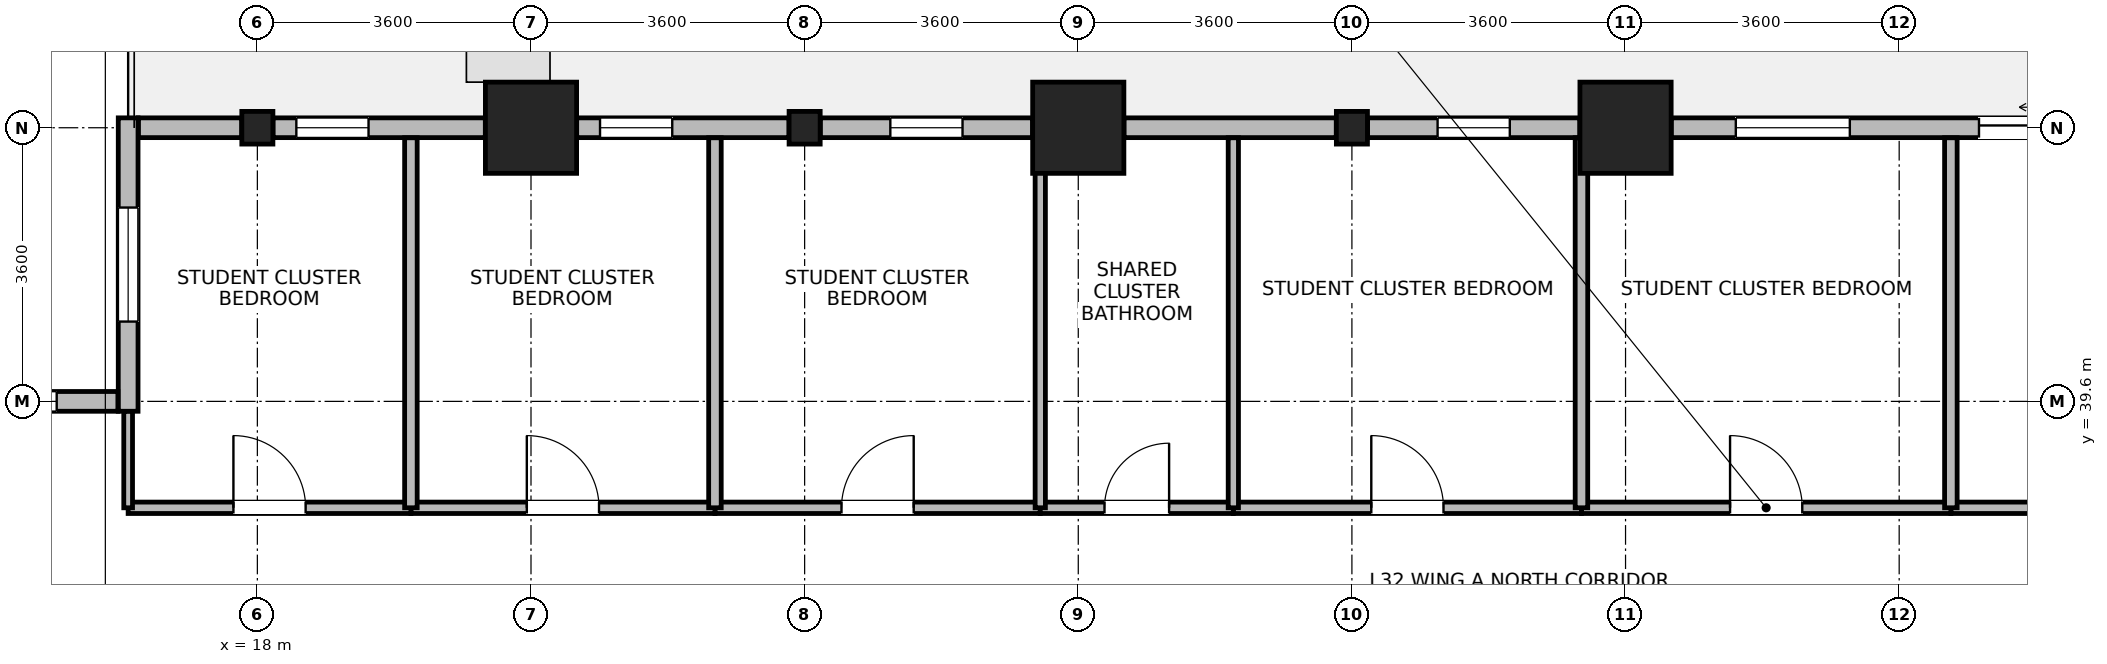
"""IFC4 building model, lengths in metres.
Left out: names, types, materials, properties, quantities, classifications, styles, units other than length and angle.
Written with IfcOpenShell. Run it as: python <this file> out.ifc"""

import sys

from ifc_helpers import new_model, si_unit, direction, frame, frame_2d, origin, origin_2d, place, context, subcontext, project, spatial, rectangle, i_section, extrude, source, transform, mapped, element, fill, save


model = new_model("IFC4")
c1 = context("Model", 3, precision=1e-05, world=origin(), true_north=direction((0.0, 1.0)))
c2 = subcontext(c1, "Body", "Model", "MODEL_VIEW")
j1 = project(units=[si_unit("LENGTHUNIT", "METRE"), si_unit("PLANEANGLEUNIT", "RADIAN")], contexts=[c1])
p1 = place(None, origin())
s1 = spatial("IfcSite", under=j1, at=p1, CompositionType="ELEMENT")
p2 = place(p1, origin())
s2 = spatial("IfcBuilding", under=s1, at=p2, CompositionType="ELEMENT")
p3 = place(p2, frame((0.0, 0.0, 126.7)))
s3 = spatial("IfcBuildingStorey", under=s2, at=p3, CompositionType="ELEMENT", Elevation=126.7)
m1 = source(origin(), c2, "Body", "SweptSolid", [
    extrude(rectangle(XDim=1.2, YDim=1.2, at=origin_2d()), origin(), (0.0, 0.0, 1.0), 3.7),
])
for number, where, z_axis, x_axis in (
    (1, (21.6, 43.2, 0.0), (0.0, 0.0, 1.0), (1.0, 0.0, 0.0)),
    (2, (28.8, 43.2, 0.0), (0.0, 0.0, 1.0), (1.0, 0.0, 0.0)),
    (3, (36.0, 43.2, 0.0), (0.0, 0.0, 1.0), (1.0, 0.0, 0.0)),
):
    element("IfcColumn", number, at=place(p3, frame(where, z_axis=z_axis, x_axis=x_axis)), inside=s3, PredefinedType="COLUMN", context=c2, shape_type="MappedRepresentation", body=[
        mapped(m1, transform((0.0, 0.0, 0.0), x_axis=(1.0, 0.0, 0.0), y_axis=(0.0, 1.0, 0.0), z_axis=(0.0, 0.0, 1.0), scale=1.0)),
    ])
m2 = source(origin(), c2, "Body", "SweptSolid", [
    extrude(i_section(OverallWidth=0.409, OverallDepth=0.43, WebThickness=0.024, FlangeThickness=0.033, FilletRadius=0.015, at=origin_2d()), origin(), (0.0, 0.0, 1.0), 3.7),
])
for number, where, z_axis, x_axis in (
    (4, (18.0, 43.2, 0.0), (0.0, 0.0, 1.0), (1.0, 0.0, 0.0)),
    (5, (25.2, 43.2, 0.0), (0.0, 0.0, 1.0), (1.0, 0.0, 0.0)),
    (6, (32.4, 43.2, 0.0), (0.0, 0.0, 1.0), (1.0, 0.0, 0.0)),
):
    element("IfcColumn", number, at=place(p3, frame(where, z_axis=z_axis, x_axis=x_axis)), inside=s3, PredefinedType="COLUMN", context=c2, shape_type="MappedRepresentation", body=[
        mapped(m2, transform((0.0, 0.0, 0.0), x_axis=(1.0, 0.0, 0.0), y_axis=(0.0, 1.0, 0.0), z_axis=(0.0, 0.0, 1.0), scale=1.0)),
    ])
p4 = place(p3, frame((36.601, 43.2, 0.0), z_axis=(0.0, 0.0, 1.0), x_axis=(1.0, 0.0, 0.0)))
e7 = element("IfcWall", 7, at=p4, inside=s3, PredefinedType="STANDARD", context=c2, shape_type="SweptSolid", body=[
    extrude(rectangle(XDim=9.598, YDim=0.26, at=frame_2d((4.799, 0.0))), origin(), (0.0, 0.0, 1.0), 2.87),
])
p5 = place(p4, frame((4.049, 0.0, 0.0)))
e8 = element("IfcOpeningElement", 8, at=p5, cuts=e7, PredefinedType="OPENING", context=c2, shape_type="SweptSolid", body=[
    extrude(rectangle(XDim=1.5, YDim=2.15, at=frame_2d((0.75, 1.075))), frame((0.0, 0.14, 0.0), z_axis=(0.0, -1.0, 0.0), x_axis=(1.0, 0.0, 0.0)), (0.0, 0.0, 1.0), 0.28),
])
p6 = place(p4, frame((0.85, 0.0, 0.85)))
e9 = element("IfcOpeningElement", 9, at=p6, cuts=e7, PredefinedType="OPENING", context=c2, shape_type="SweptSolid", body=[
    extrude(rectangle(XDim=1.5, YDim=1.85, at=frame_2d((0.75, 0.925))), frame((0.0, 0.14, 0.0), z_axis=(0.0, -1.0, 0.0), x_axis=(1.0, 0.0, 0.0)), (0.0, 0.0, 1.0), 0.28),
])
p7 = place(p4, frame((7.248, 0.0, 0.85)))
e10 = element("IfcOpeningElement", 10, at=p7, cuts=e7, PredefinedType="OPENING", context=c2, shape_type="SweptSolid", body=[
    extrude(rectangle(XDim=1.5, YDim=1.85, at=frame_2d((0.75, 0.925))), frame((0.0, 0.14, 0.0), z_axis=(0.0, -1.0, 0.0), x_axis=(1.0, 0.0, 0.0)), (0.0, 0.0, 1.0), 0.28),
])
p8 = place(p3, frame((32.605, 43.2, 0.0), z_axis=(0.0, 0.0, 1.0), x_axis=(1.0, 0.0, 0.0)))
e11 = element("IfcWall", 11, at=p8, inside=s3, PredefinedType="STANDARD", context=c2, shape_type="SweptSolid", body=[
    extrude(rectangle(XDim=2.793, YDim=0.26, at=frame_2d((1.397, 0.0))), origin(), (0.0, 0.0, 1.0), 2.87),
])
p9 = place(p8, frame((0.922, 0.0, 0.85)))
e12 = element("IfcOpeningElement", 12, at=p9, cuts=e11, PredefinedType="OPENING", context=c2, shape_type="SweptSolid", body=[
    extrude(rectangle(XDim=0.95, YDim=1.75, at=frame_2d((0.475, 0.875))), frame((0.0, 0.14, 0.0), z_axis=(0.0, -1.0, 0.0), x_axis=(1.0, 0.0, 0.0)), (0.0, 0.0, 1.0), 0.28),
])
p10 = place(p3, frame((29.401, 43.2, 0.0), z_axis=(0.0, 0.0, 1.0), x_axis=(1.0, 0.0, 0.0)))
e13 = element("IfcWall", 13, at=p10, inside=s3, PredefinedType="STANDARD", context=c2, shape_type="SweptSolid", body=[
    extrude(rectangle(XDim=2.794, YDim=0.26, at=frame_2d((1.397, 0.0))), origin(), (0.0, 0.0, 1.0), 2.87),
])
p11 = place(p3, frame((25.406, 43.2, 0.0), z_axis=(0.0, 0.0, 1.0), x_axis=(1.0, 0.0, 0.0)))
e14 = element("IfcWall", 14, at=p11, inside=s3, PredefinedType="STANDARD", context=c2, shape_type="SweptSolid", body=[
    extrude(rectangle(XDim=2.793, YDim=0.26, at=frame_2d((1.397, 0.0))), origin(), (0.0, 0.0, 1.0), 2.87),
])
p12 = place(p11, frame((0.922, 0.0, 0.85)))
e15 = element("IfcOpeningElement", 15, at=p12, cuts=e14, PredefinedType="OPENING", context=c2, shape_type="SweptSolid", body=[
    extrude(rectangle(XDim=0.95, YDim=1.75, at=frame_2d((0.475, 0.875))), frame((0.0, 0.14, 0.0), z_axis=(0.0, -1.0, 0.0), x_axis=(1.0, 0.0, 0.0)), (0.0, 0.0, 1.0), 0.28),
])
p13 = place(p3, frame((22.201, 43.2, 0.0), z_axis=(0.0, 0.0, 1.0), x_axis=(1.0, 0.0, 0.0)))
e16 = element("IfcWall", 16, at=p13, inside=s3, PredefinedType="STANDARD", context=c2, shape_type="SweptSolid", body=[
    extrude(rectangle(XDim=2.793, YDim=0.26, at=frame_2d((1.397, 0.0))), origin(), (0.0, 0.0, 1.0), 2.87),
])
p14 = place(p13, frame((0.307, 0.0, 0.85)))
e17 = element("IfcOpeningElement", 17, at=p14, cuts=e16, PredefinedType="OPENING", context=c2, shape_type="SweptSolid", body=[
    extrude(rectangle(XDim=0.95, YDim=1.75, at=frame_2d((0.475, 0.875))), frame((0.0, 0.14, 0.0), z_axis=(0.0, -1.0, 0.0), x_axis=(1.0, 0.0, 0.0)), (0.0, 0.0, 1.0), 0.28),
])
p15 = place(p3, frame((18.206, 43.2, 0.0), z_axis=(0.0, 0.0, 1.0), x_axis=(1.0, 0.0, 0.0)))
e18 = element("IfcWall", 18, at=p15, inside=s3, PredefinedType="STANDARD", context=c2, shape_type="SweptSolid", body=[
    extrude(rectangle(XDim=2.793, YDim=0.26, at=frame_2d((1.397, 0.0))), origin(), (0.0, 0.0, 1.0), 2.87),
])
p16 = place(p15, frame((0.307, 0.0, 0.85)))
e19 = element("IfcOpeningElement", 19, at=p16, cuts=e18, PredefinedType="OPENING", context=c2, shape_type="SweptSolid", body=[
    extrude(rectangle(XDim=0.95, YDim=1.75, at=frame_2d((0.475, 0.875))), frame((0.0, 0.14, 0.0), z_axis=(0.0, -1.0, 0.0), x_axis=(1.0, 0.0, 0.0)), (0.0, 0.0, 1.0), 0.28),
])
p17 = place(p3, frame((16.435, 43.2, 0.0), z_axis=(0.0, 0.0, 1.0), x_axis=(1.0, 0.0, 0.0)))
e20 = element("IfcWall", 20, at=p17, inside=s3, PredefinedType="STANDARD", context=c2, shape_type="SweptSolid", body=[
    extrude(rectangle(XDim=1.359, YDim=0.26, at=frame_2d((0.68, 0.0))), origin(), (0.0, 0.0, 1.0), 2.87),
])
p18 = place(p3, frame((16.3, 39.47, 0.0), z_axis=(0.0, 0.0, 1.0), x_axis=(0.0, 1.0, 0.0)))
e21 = element("IfcWall", 21, at=p18, inside=s3, PredefinedType="STANDARD", context=c2, shape_type="SweptSolid", body=[
    extrude(rectangle(XDim=3.86, YDim=0.26, at=frame_2d((1.93, 0.0))), origin(), (0.0, 0.0, 1.0), 3.32),
])
p19 = place(p18, frame((1.18, 0.0, 0.85)))
e22 = element("IfcOpeningElement", 22, at=p19, cuts=e21, PredefinedType="OPENING", context=c2, shape_type="SweptSolid", body=[
    extrude(rectangle(XDim=1.5, YDim=1.85, at=frame_2d((0.75, 0.925))), frame((0.0, 0.14, 0.0), z_axis=(0.0, -1.0, 0.0), x_axis=(1.0, 0.0, 0.0)), (0.0, 0.0, 1.0), 0.28),
])
p20 = place(p3, frame((6.835, 39.6, 0.0), z_axis=(0.0, 0.0, 1.0), x_axis=(1.0, 0.0, 0.0)))
e23 = element("IfcWall", 23, at=p20, inside=s3, PredefinedType="STANDARD", context=c2, shape_type="SweptSolid", body=[
    extrude(rectangle(XDim=9.33, YDim=0.26, at=frame_2d((4.665, 0.0))), origin(), (0.0, 0.0, 1.0), 3.32),
])
p21 = place(p20, frame((0.805, 0.0, 0.85)))
e24 = element("IfcOpeningElement", 24, at=p21, cuts=e23, PredefinedType="OPENING", context=c2, shape_type="SweptSolid", body=[
    extrude(rectangle(XDim=1.5, YDim=1.85, at=frame_2d((0.75, 0.925))), frame((0.0, 0.14, 0.0), z_axis=(0.0, -1.0, 0.0), x_axis=(1.0, 0.0, 0.0)), (0.0, 0.0, 1.0), 0.28),
])
p22 = place(p20, frame((3.915, 0.0, 0.85)))
e25 = element("IfcOpeningElement", 25, at=p22, cuts=e23, PredefinedType="OPENING", context=c2, shape_type="SweptSolid", body=[
    extrude(rectangle(XDim=1.5, YDim=1.85, at=frame_2d((0.75, 0.925))), frame((0.0, 0.14, 0.0), z_axis=(0.0, -1.0, 0.0), x_axis=(1.0, 0.0, 0.0)), (0.0, 0.0, 1.0), 0.28),
])
p23 = place(p20, frame((7.025, 0.0, 0.85)))
e26 = element("IfcOpeningElement", 26, at=p23, cuts=e23, PredefinedType="OPENING", context=c2, shape_type="SweptSolid", body=[
    extrude(rectangle(XDim=1.5, YDim=1.85, at=frame_2d((0.75, 0.925))), frame((0.0, 0.14, 0.0), z_axis=(0.0, -1.0, 0.0), x_axis=(1.0, 0.0, 0.0)), (0.0, 0.0, 1.0), 0.28),
])
p24 = place(p3, frame((40.28, 38.2, 0.0), z_axis=(0.0, 0.0, 1.0), x_axis=(1.0, 0.0, 0.0)))
e27 = element("IfcWall", 27, at=p24, inside=s3, PredefinedType="PARTITIONING", context=c2, shape_type="SweptSolid", body=[
    extrude(rectangle(XDim=8.96, YDim=0.15, at=frame_2d((4.48, 0.0))), origin(), (0.0, 0.0, 1.0), 3.32),
])
p25 = place(p24, frame((4.03, 0.0, 0.0)))
e28 = element("IfcOpeningElement", 28, at=p25, cuts=e27, PredefinedType="OPENING", context=c2, shape_type="SweptSolid", body=[
    extrude(rectangle(XDim=0.9, YDim=2.08, at=frame_2d((0.45, 1.04))), frame((0.0, 0.085, 0.0), z_axis=(0.0, -1.0, 0.0), x_axis=(1.0, 0.0, 0.0)), (0.0, 0.0, 1.0), 0.17),
])
p26 = place(p3, frame((35.42, 38.2, 0.0), z_axis=(0.0, 0.0, 1.0), x_axis=(1.0, 0.0, 0.0)))
e29 = element("IfcWall", 29, at=p26, inside=s3, PredefinedType="PARTITIONING", context=c2, shape_type="SweptSolid", body=[
    extrude(rectangle(XDim=4.86, YDim=0.15, at=frame_2d((2.43, 0.0))), origin(), (0.0, 0.0, 1.0), 3.32),
])
p27 = place(p26, frame((1.955, 0.0, 0.0)))
e30 = element("IfcOpeningElement", 30, at=p27, cuts=e29, PredefinedType="OPENING", context=c2, shape_type="SweptSolid", body=[
    extrude(rectangle(XDim=0.95, YDim=2.1, at=frame_2d((0.475, 1.05))), frame((0.0, 0.085, 0.0), z_axis=(0.0, -1.0, 0.0), x_axis=(1.0, 0.0, 0.0)), (0.0, 0.0, 1.0), 0.17),
])
p28 = place(p3, frame((30.84, 38.2, 0.0), z_axis=(0.0, 0.0, 1.0), x_axis=(1.0, 0.0, 0.0)))
e31 = element("IfcWall", 31, at=p28, inside=s3, PredefinedType="PARTITIONING", context=c2, shape_type="SweptSolid", body=[
    extrude(rectangle(XDim=4.58, YDim=0.15, at=frame_2d((2.29, 0.0))), origin(), (0.0, 0.0, 1.0), 3.32),
])
p29 = place(p28, frame((1.815, 0.0, 0.0)))
e32 = element("IfcOpeningElement", 32, at=p29, cuts=e31, PredefinedType="OPENING", context=c2, shape_type="SweptSolid", body=[
    extrude(rectangle(XDim=0.95, YDim=2.1, at=frame_2d((0.475, 1.05))), frame((0.0, 0.085, 0.0), z_axis=(0.0, -1.0, 0.0), x_axis=(1.0, 0.0, 0.0)), (0.0, 0.0, 1.0), 0.17),
])
p30 = place(p3, frame((24.02, 38.2, 0.0), z_axis=(0.0, 0.0, 1.0), x_axis=(1.0, 0.0, 0.0)))
e33 = element("IfcWall", 33, at=p30, inside=s3, PredefinedType="PARTITIONING", context=c2, shape_type="SweptSolid", body=[
    extrude(rectangle(XDim=4.28, YDim=0.15, at=frame_2d((2.14, 0.0))), origin(), (0.0, 0.0, 1.0), 3.32),
])
p31 = place(p30, frame((1.665, 0.0, 0.0)))
e34 = element("IfcOpeningElement", 34, at=p31, cuts=e33, PredefinedType="OPENING", context=c2, shape_type="SweptSolid", body=[
    extrude(rectangle(XDim=0.95, YDim=2.1, at=frame_2d((0.475, 1.05))), frame((0.0, 0.085, 0.0), z_axis=(0.0, -1.0, 0.0), x_axis=(1.0, 0.0, 0.0)), (0.0, 0.0, 1.0), 0.17),
])
p32 = place(p3, frame((20.02, 38.2, 0.0), z_axis=(0.0, 0.0, 1.0), x_axis=(1.0, 0.0, 0.0)))
e35 = element("IfcWall", 35, at=p32, inside=s3, PredefinedType="PARTITIONING", context=c2, shape_type="SweptSolid", body=[
    extrude(rectangle(XDim=4.0, YDim=0.15, at=frame_2d((2.0, 0.0))), origin(), (0.0, 0.0, 1.0), 3.32),
])
p33 = place(p32, frame((1.525, 0.0, 0.0)))
e36 = element("IfcOpeningElement", 36, at=p33, cuts=e35, PredefinedType="OPENING", context=c2, shape_type="SweptSolid", body=[
    extrude(rectangle(XDim=0.95, YDim=2.1, at=frame_2d((0.475, 1.05))), frame((0.0, 0.085, 0.0), z_axis=(0.0, -1.0, 0.0), x_axis=(1.0, 0.0, 0.0)), (0.0, 0.0, 1.0), 0.17),
])
p34 = place(p3, frame((16.3, 38.2, 0.0), z_axis=(0.0, 0.0, 1.0), x_axis=(1.0, 0.0, 0.0)))
e37 = element("IfcWall", 37, at=p34, inside=s3, PredefinedType="PARTITIONING", context=c2, shape_type="SweptSolid", body=[
    extrude(rectangle(XDim=3.72, YDim=0.15, at=frame_2d((1.86, 0.0))), origin(), (0.0, 0.0, 1.0), 3.32),
])
p35 = place(p34, frame((1.385, 0.0, 0.0)))
e38 = element("IfcOpeningElement", 38, at=p35, cuts=e37, PredefinedType="OPENING", context=c2, shape_type="SweptSolid", body=[
    extrude(rectangle(XDim=0.95, YDim=2.1, at=frame_2d((0.475, 1.05))), frame((0.0, 0.085, 0.0), z_axis=(0.0, -1.0, 0.0), x_axis=(1.0, 0.0, 0.0)), (0.0, 0.0, 1.0), 0.17),
])
p36 = place(p3, frame((28.3, 38.2, 0.0), z_axis=(0.0, 0.0, 1.0), x_axis=(1.0, 0.0, 0.0)))
e39 = element("IfcWall", 39, at=p36, inside=s3, PredefinedType="PARTITIONING", context=c2, shape_type="SweptSolid", body=[
    extrude(rectangle(XDim=2.54, YDim=0.15, at=frame_2d((1.27, 0.0))), origin(), (0.0, 0.0, 1.0), 3.32),
])
p37 = place(p36, frame((0.845, 0.0, 0.0)))
e40 = element("IfcOpeningElement", 40, at=p37, cuts=e39, PredefinedType="OPENING", context=c2, shape_type="SweptSolid", body=[
    extrude(rectangle(XDim=0.85, YDim=2.04, at=frame_2d((0.425, 1.02))), frame((0.0, 0.085, 0.0), z_axis=(0.0, -1.0, 0.0), x_axis=(1.0, 0.0, 0.0)), (0.0, 0.0, 1.0), 0.17),
])
p38 = place(p3, frame((16.3, 38.2, 0.0), z_axis=(0.0, 0.0, 1.0), x_axis=(0.0, 1.0, 0.0)))
e41 = element("IfcWall", 41, at=p38, inside=s3, PredefinedType="PARTITIONING", context=c2, shape_type="SweptSolid", body=[
    extrude(rectangle(XDim=1.268, YDim=0.115, at=frame_2d((0.634, 0.0))), origin(), (0.0, 0.0, 1.0), 3.32),
])
for number, where, z_axis, x_axis in (
    (42, (20.02, 38.2, 0.0), (0.0, 0.0, 1.0), (0.0, 1.0, 0.0)),
    (43, (24.02, 38.2, 0.0), (0.0, 0.0, 1.0), (0.0, 1.0, 0.0)),
):
    element("IfcWall", number, at=place(p3, frame(where, z_axis=z_axis, x_axis=x_axis)), inside=s3, PredefinedType="PARTITIONING", context=c2, shape_type="SweptSolid", body=[
        extrude(rectangle(XDim=4.868, YDim=0.165, at=frame_2d((2.434, 0.0))), origin(), (0.0, 0.0, 1.0), 3.32),
    ])
for number, where, z_axis, x_axis in (
    (44, (28.3, 38.2, 0.0), (0.0, 0.0, 1.0), (0.0, 1.0, 0.0)),
    (45, (30.84, 38.2, 0.0), (0.0, 0.0, 1.0), (0.0, 1.0, 0.0)),
):
    element("IfcWall", number, at=place(p3, frame(where, z_axis=z_axis, x_axis=x_axis)), inside=s3, PredefinedType="PARTITIONING", context=c2, shape_type="SweptSolid", body=[
        extrude(rectangle(XDim=4.868, YDim=0.135, at=frame_2d((2.434, 0.0))), origin(), (0.0, 0.0, 1.0), 3.32),
    ])
for number, where, z_axis, x_axis in (
    (46, (35.42, 38.2, 0.0), (0.0, 0.0, 1.0), (0.0, 1.0, 0.0)),
    (47, (40.28, 38.2, 0.0), (0.0, 0.0, 1.0), (0.0, 1.0, 0.0)),
):
    element("IfcWall", number, at=place(p3, frame(where, z_axis=z_axis, x_axis=x_axis)), inside=s3, PredefinedType="PARTITIONING", context=c2, shape_type="SweptSolid", body=[
        extrude(rectangle(XDim=4.868, YDim=0.165, at=frame_2d((2.434, 0.0))), origin(), (0.0, 0.0, 1.0), 3.32),
    ])
p39 = place(p5, origin())
e48 = element("IfcDoor", 48, at=p39, inside=s3, OperationType="SLIDING_TO_LEFT", PredefinedType="DOOR", context=c2, shape_type="SweptSolid", body=[
    extrude(rectangle(XDim=1.5, YDim=2.15, at=frame_2d((0.75, 1.075))), frame((0.0, 0.025, 0.0), z_axis=(0.0, -1.0, 0.0), x_axis=(1.0, 0.0, 0.0)), (0.0, 0.0, 1.0), 0.05),
])
fill(e8, e48)
p40 = place(p6, origin())
e49 = element("IfcWindow", 49, at=p40, inside=s3, PartitioningType="SINGLE_PANEL", PredefinedType="WINDOW", context=c2, shape_type="SweptSolid", body=[
    extrude(rectangle(XDim=1.5, YDim=1.85, at=frame_2d((0.75, 0.925))), frame((0.0, 0.03, 0.0), z_axis=(0.0, -1.0, 0.0), x_axis=(1.0, 0.0, 0.0)), (0.0, 0.0, 1.0), 0.06),
])
fill(e9, e49)
p41 = place(p9, origin())
e50 = element("IfcWindow", 50, at=p41, inside=s3, PartitioningType="SINGLE_PANEL", PredefinedType="WINDOW", context=c2, shape_type="SweptSolid", body=[
    extrude(rectangle(XDim=0.95, YDim=1.75, at=frame_2d((0.475, 0.875))), frame((0.0, 0.03, 0.0), z_axis=(0.0, -1.0, 0.0), x_axis=(1.0, 0.0, 0.0)), (0.0, 0.0, 1.0), 0.06),
])
fill(e12, e50)
p42 = place(p12, origin())
e51 = element("IfcWindow", 51, at=p42, inside=s3, PartitioningType="SINGLE_PANEL", PredefinedType="WINDOW", context=c2, shape_type="SweptSolid", body=[
    extrude(rectangle(XDim=0.95, YDim=1.75, at=frame_2d((0.475, 0.875))), frame((0.0, 0.03, 0.0), z_axis=(0.0, -1.0, 0.0), x_axis=(1.0, 0.0, 0.0)), (0.0, 0.0, 1.0), 0.06),
])
fill(e15, e51)
p43 = place(p14, origin())
e52 = element("IfcWindow", 52, at=p43, inside=s3, PartitioningType="SINGLE_PANEL", PredefinedType="WINDOW", context=c2, shape_type="SweptSolid", body=[
    extrude(rectangle(XDim=0.95, YDim=1.75, at=frame_2d((0.475, 0.875))), frame((0.0, 0.03, 0.0), z_axis=(0.0, -1.0, 0.0), x_axis=(1.0, 0.0, 0.0)), (0.0, 0.0, 1.0), 0.06),
])
fill(e17, e52)
p44 = place(p16, origin())
e53 = element("IfcWindow", 53, at=p44, inside=s3, PartitioningType="SINGLE_PANEL", PredefinedType="WINDOW", context=c2, shape_type="SweptSolid", body=[
    extrude(rectangle(XDim=0.95, YDim=1.75, at=frame_2d((0.475, 0.875))), frame((0.0, 0.03, 0.0), z_axis=(0.0, -1.0, 0.0), x_axis=(1.0, 0.0, 0.0)), (0.0, 0.0, 1.0), 0.06),
])
fill(e19, e53)
p45 = place(p19, origin())
e54 = element("IfcWindow", 54, at=p45, inside=s3, PartitioningType="SINGLE_PANEL", PredefinedType="WINDOW", context=c2, shape_type="SweptSolid", body=[
    extrude(rectangle(XDim=1.5, YDim=1.85, at=frame_2d((0.75, 0.925))), frame((0.0, 0.03, 0.0), z_axis=(0.0, -1.0, 0.0), x_axis=(1.0, 0.0, 0.0)), (0.0, 0.0, 1.0), 0.06),
])
fill(e22, e54)
p46 = place(p23, origin())
e55 = element("IfcWindow", 55, at=p46, inside=s3, PartitioningType="SINGLE_PANEL", PredefinedType="WINDOW", context=c2, shape_type="SweptSolid", body=[
    extrude(rectangle(XDim=1.5, YDim=1.85, at=frame_2d((0.75, 0.925))), frame((0.0, 0.03, 0.0), z_axis=(0.0, -1.0, 0.0), x_axis=(1.0, 0.0, 0.0)), (0.0, 0.0, 1.0), 0.06),
])
fill(e26, e55)
p47 = place(p27, origin())
e56 = element("IfcDoor", 56, at=p47, inside=s3, OperationType="SINGLE_SWING_LEFT", PredefinedType="DOOR", context=c2, shape_type="SweptSolid", body=[
    extrude(rectangle(XDim=0.95, YDim=2.1, at=frame_2d((0.475, 1.05))), frame((0.0, 0.025, 0.0), z_axis=(0.0, -1.0, 0.0), x_axis=(1.0, 0.0, 0.0)), (0.0, 0.0, 1.0), 0.05),
])
fill(e30, e56)
p48 = place(p29, origin())
e57 = element("IfcDoor", 57, at=p48, inside=s3, OperationType="SINGLE_SWING_LEFT", PredefinedType="DOOR", context=c2, shape_type="SweptSolid", body=[
    extrude(rectangle(XDim=0.95, YDim=2.1, at=frame_2d((0.475, 1.05))), frame((0.0, 0.025, 0.0), z_axis=(0.0, -1.0, 0.0), x_axis=(1.0, 0.0, 0.0)), (0.0, 0.0, 1.0), 0.05),
])
fill(e32, e57)
p49 = place(p31, origin())
e58 = element("IfcDoor", 58, at=p49, inside=s3, OperationType="SINGLE_SWING_RIGHT", PredefinedType="DOOR", context=c2, shape_type="SweptSolid", body=[
    extrude(rectangle(XDim=0.95, YDim=2.1, at=frame_2d((0.475, 1.05))), frame((0.0, 0.025, 0.0), z_axis=(0.0, -1.0, 0.0), x_axis=(1.0, 0.0, 0.0)), (0.0, 0.0, 1.0), 0.05),
])
fill(e34, e58)
p50 = place(p33, origin())
e59 = element("IfcDoor", 59, at=p50, inside=s3, OperationType="SINGLE_SWING_LEFT", PredefinedType="DOOR", context=c2, shape_type="SweptSolid", body=[
    extrude(rectangle(XDim=0.95, YDim=2.1, at=frame_2d((0.475, 1.05))), frame((0.0, 0.025, 0.0), z_axis=(0.0, -1.0, 0.0), x_axis=(1.0, 0.0, 0.0)), (0.0, 0.0, 1.0), 0.05),
])
fill(e36, e59)
p51 = place(p35, origin())
e60 = element("IfcDoor", 60, at=p51, inside=s3, OperationType="SINGLE_SWING_LEFT", PredefinedType="DOOR", context=c2, shape_type="SweptSolid", body=[
    extrude(rectangle(XDim=0.95, YDim=2.1, at=frame_2d((0.475, 1.05))), frame((0.0, 0.025, 0.0), z_axis=(0.0, -1.0, 0.0), x_axis=(1.0, 0.0, 0.0)), (0.0, 0.0, 1.0), 0.05),
])
fill(e38, e60)
p52 = place(p37, origin())
e61 = element("IfcDoor", 61, at=p52, inside=s3, OperationType="SINGLE_SWING_RIGHT", PredefinedType="DOOR", context=c2, shape_type="SweptSolid", body=[
    extrude(rectangle(XDim=0.85, YDim=2.04, at=frame_2d((0.425, 1.02))), frame((0.0, 0.025, 0.0), z_axis=(0.0, -1.0, 0.0), x_axis=(1.0, 0.0, 0.0)), (0.0, 0.0, 1.0), 0.05),
])
fill(e40, e61)
save(model, sys.argv[1])
